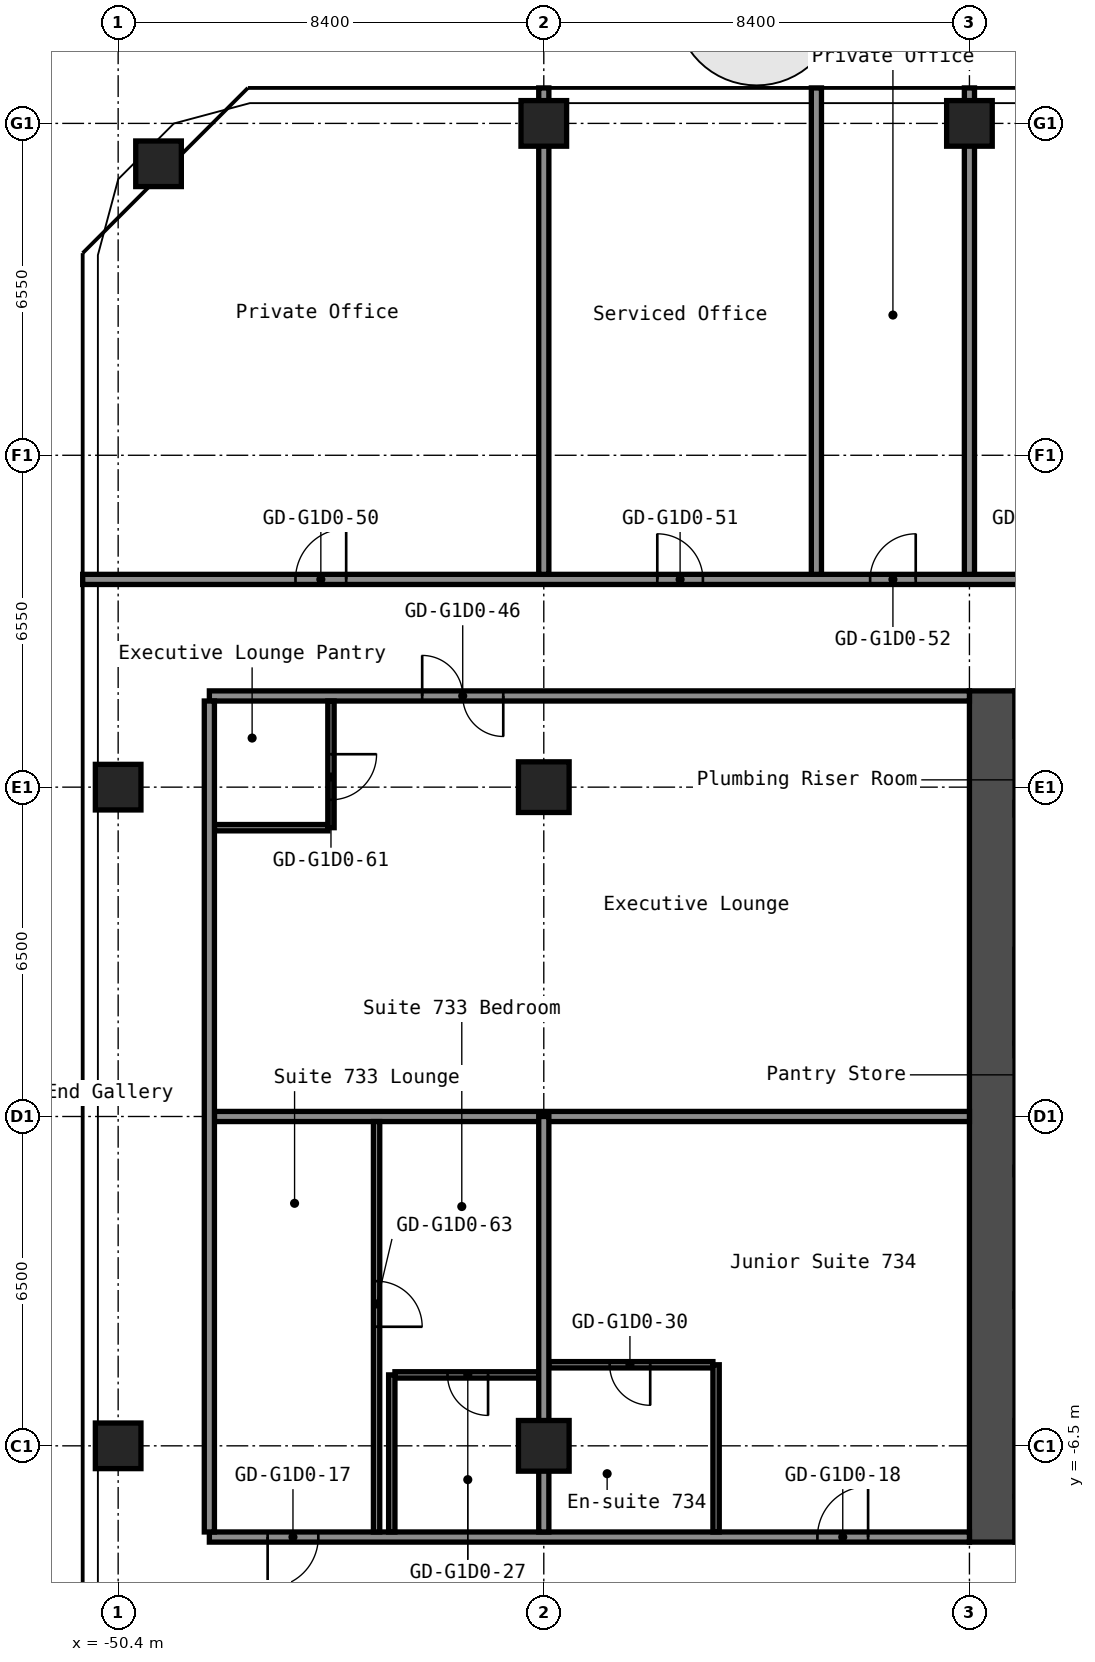
"""IFC4 building model, lengths in metres.
Left out: names, types, materials, properties, quantities, classifications, styles, units other than length and angle.
Written with IfcOpenShell. Run it as: python <this file> out.ifc"""

import sys

from ifc_helpers import new_model, si_unit, direction, frame, frame_2d, origin, origin_2d, place, context, subcontext, project, spatial, rectangle, hollow_rectangle, extrude, element, fill, save


model = new_model("IFC4")
c1 = context("Model", 3, precision=1e-05, world=origin(), true_north=direction((0.0, 1.0)))
c2 = subcontext(c1, "Body", "Model", "MODEL_VIEW")
j1 = project(units=[si_unit("LENGTHUNIT", "METRE"), si_unit("PLANEANGLEUNIT", "RADIAN")], contexts=[c1])
p1 = place(None, origin())
s1 = spatial("IfcSite", under=j1, at=p1, CompositionType="ELEMENT")
p2 = place(p1, origin())
s2 = spatial("IfcBuilding", under=s1, at=p2, CompositionType="ELEMENT")
p3 = place(p2, frame((0.0, 0.0, 29.4)))
s3 = spatial("IfcBuildingStorey", under=s2, at=p3, CompositionType="ELEMENT", Elevation=29.4)
for number, where, z_axis, x_axis in (
    (1, (-50.4, -6.5, 0.0), (0.0, 0.0, 1.0), (1.0, 0.0, 0.0)),
    (2, (-50.4, 6.5, 0.0), (0.0, 0.0, 1.0), (1.0, 0.0, 0.0)),
    (3, (-49.603, 18.803, 0.0), (0.0, 0.0, 1.0), (1.0, 0.0, 0.0)),
):
    element("IfcColumn", number, at=place(p3, frame(where, z_axis=z_axis, x_axis=x_axis)), inside=s3, PredefinedType="COLUMN", context=c2, shape_type="SweptSolid", body=[
        extrude(hollow_rectangle(XDim=0.9, YDim=0.9, WallThickness=0.036, at=origin_2d()), origin(), (0.0, 0.0, 1.0), 2.8),
    ])
for number, where, z_axis, x_axis in (
    (4, (-42.0, -6.5, 0.0), (0.0, 0.0, 1.0), (1.0, 0.0, 0.0)),
    (5, (-42.0, 6.5, 0.0), (0.0, 0.0, 1.0), (1.0, 0.0, 0.0)),
):
    element("IfcColumn", number, at=place(p3, frame(where, z_axis=z_axis, x_axis=x_axis)), inside=s3, PredefinedType="COLUMN", context=c2, shape_type="SweptSolid", body=[
        extrude(hollow_rectangle(XDim=1.0, YDim=1.0, WallThickness=0.04, at=origin_2d()), origin(), (0.0, 0.0, 1.0), 2.8),
    ])
for number, where, z_axis, x_axis in (
    (6, (-42.0, 19.6, 0.0), (0.0, 0.0, 1.0), (1.0, 0.0, 0.0)),
    (7, (-33.6, 19.6, 0.0), (0.0, 0.0, 1.0), (1.0, 0.0, 0.0)),
):
    element("IfcColumn", number, at=place(p3, frame(where, z_axis=z_axis, x_axis=x_axis)), inside=s3, PredefinedType="COLUMN", context=c2, shape_type="SweptSolid", body=[
        extrude(hollow_rectangle(XDim=0.9, YDim=0.9, WallThickness=0.036, at=origin_2d()), origin(), (0.0, 0.0, 1.0), 2.8),
    ])
p4 = place(p3, frame((-33.15, -8.4, 0.0), z_axis=(0.0, 0.0, 1.0), x_axis=(0.0, 1.0, 0.0)))
e8 = element("IfcWall", 8, at=p4, inside=s3, PredefinedType="SHEAR", context=c2, shape_type="SweptSolid", body=[
    extrude(rectangle(XDim=16.8, YDim=0.9, at=frame_2d((8.4, 0.0))), origin(), (0.0, 0.0, 1.0), 2.8),
])
p5 = place(p3, frame((-32.7, 1.325, 0.0), z_axis=(0.0, 0.0, 1.0), x_axis=(1.0, 0.0, 0.0)))
e9 = element("IfcWall", 9, at=p5, inside=s3, PredefinedType="SHEAR", context=c2, shape_type="SweptSolid", body=[
    extrude(rectangle(XDim=5.05, YDim=0.25, at=frame_2d((2.525, 0.0))), origin(), (0.0, 0.0, 1.0), 2.8),
])
p6 = place(p5, frame((3.3, 0.0, 0.0)))
e10 = element("IfcOpeningElement", 10, at=p6, cuts=e9, PredefinedType="OPENING", context=c2, shape_type="SweptSolid", body=[
    extrude(rectangle(XDim=1.2, YDim=2.1, at=frame_2d((0.6, 1.05))), frame((0.0, 0.135, 0.0), z_axis=(0.0, -1.0, 0.0), x_axis=(1.0, 0.0, 0.0)), (0.0, 0.0, 1.0), 0.27),
])
p7 = place(p3, frame((-32.7, -3.625, 0.0), z_axis=(0.0, 0.0, 1.0), x_axis=(1.0, 0.0, 0.0)))
e11 = element("IfcWall", 11, at=p7, inside=s3, PredefinedType="SHEAR", context=c2, shape_type="SweptSolid", body=[
    extrude(rectangle(XDim=4.55, YDim=0.25, at=frame_2d((2.275, 0.0))), origin(), (0.0, 0.0, 1.0), 2.8),
])
p8 = place(p7, frame((2.85, 0.0, 0.0)))
e12 = element("IfcOpeningElement", 12, at=p8, cuts=e11, PredefinedType="OPENING", context=c2, shape_type="SweptSolid", body=[
    extrude(rectangle(XDim=1.1, YDim=2.1, at=frame_2d((0.55, 1.05))), frame((0.0, 0.135, 0.0), z_axis=(0.0, -1.0, 0.0), x_axis=(1.0, 0.0, 0.0)), (0.0, 0.0, 1.0), 0.27),
])
p9 = place(p7, frame((0.6, 0.0, 0.0)))
e13 = element("IfcOpeningElement", 13, at=p9, cuts=e11, PredefinedType="OPENING", context=c2, shape_type="SweptSolid", body=[
    extrude(rectangle(XDim=1.1, YDim=2.1, at=frame_2d((0.55, 1.05))), frame((0.0, 0.135, 0.0), z_axis=(0.0, -1.0, 0.0), x_axis=(1.0, 0.0, 0.0)), (0.0, 0.0, 1.0), 0.27),
])
p10 = place(p3, frame((-32.7, -6.75, 0.0), z_axis=(0.0, 0.0, 1.0), x_axis=(1.0, 0.0, 0.0)))
e14 = element("IfcWall", 14, at=p10, inside=s3, PredefinedType="SHEAR", context=c2, shape_type="SweptSolid", body=[
    extrude(rectangle(XDim=4.55, YDim=1.5, at=frame_2d((2.275, 0.0))), origin(), (0.0, 0.0, 1.0), 2.8),
])
p11 = place(p3, frame((-48.6, -8.3, 0.0), z_axis=(0.0, 0.0, 1.0), x_axis=(1.0, 0.0, 0.0)))
e15 = element("IfcWall", 15, at=p11, inside=s3, PredefinedType="PARTITIONING", context=c2, shape_type="SweptSolid", body=[
    extrude(rectangle(XDim=15.0, YDim=0.2, at=frame_2d((7.5, 0.0))), origin(), (0.0, 0.0, 1.0), 2.8),
])
p12 = place(p11, frame((1.15, 0.0, 0.0)))
e16 = element("IfcOpeningElement", 16, at=p12, cuts=e15, PredefinedType="OPENING", context=c2, shape_type="SweptSolid", body=[
    extrude(rectangle(XDim=1.0, YDim=2.1, at=frame_2d((0.5, 1.05))), frame((0.0, 0.11, 0.0), z_axis=(0.0, -1.0, 0.0), x_axis=(1.0, 0.0, 0.0)), (0.0, 0.0, 1.0), 0.22),
])
p13 = place(p11, frame((12.0, 0.0, 0.0)))
e17 = element("IfcOpeningElement", 17, at=p13, cuts=e15, PredefinedType="OPENING", context=c2, shape_type="SweptSolid", body=[
    extrude(rectangle(XDim=1.0, YDim=2.1, at=frame_2d((0.5, 1.05))), frame((0.0, 0.11, 0.0), z_axis=(0.0, -1.0, 0.0), x_axis=(1.0, 0.0, 0.0)), (0.0, 0.0, 1.0), 0.22),
])
p14 = place(p3, frame((-44.938, -5.1, 0.0), z_axis=(0.0, 0.0, 1.0), x_axis=(1.0, 0.0, 0.0)))
e18 = element("IfcWall", 18, at=p14, inside=s3, PredefinedType="PARTITIONING", context=c2, shape_type="SweptSolid", body=[
    extrude(rectangle(XDim=2.837, YDim=0.125, at=frame_2d((1.419, 0.0))), origin(), (0.0, 0.0, 1.0), 2.8),
])
p15 = place(p14, frame((1.038, 0.0, 0.0)))
e19 = element("IfcOpeningElement", 19, at=p15, cuts=e18, PredefinedType="OPENING", context=c2, shape_type="SweptSolid", body=[
    extrude(rectangle(XDim=0.8, YDim=2.1, at=frame_2d((0.4, 1.05))), frame((0.0, 0.073, 0.0), z_axis=(0.0, -1.0, 0.0), x_axis=(1.0, 0.0, 0.0)), (0.0, 0.0, 1.0), 0.145),
])
p16 = place(p3, frame((-41.9, -4.9, 0.0), z_axis=(0.0, 0.0, 1.0), x_axis=(1.0, 0.0, 0.0)))
e20 = element("IfcWall", 20, at=p16, inside=s3, PredefinedType="PARTITIONING", context=c2, shape_type="SweptSolid", body=[
    extrude(rectangle(XDim=3.237, YDim=0.125, at=frame_2d((1.619, 0.0))), origin(), (0.0, 0.0, 1.0), 2.8),
])
p17 = place(p16, frame((1.2, 0.0, 0.0)))
e21 = element("IfcOpeningElement", 21, at=p17, cuts=e20, PredefinedType="OPENING", context=c2, shape_type="SweptSolid", body=[
    extrude(rectangle(XDim=0.8, YDim=2.1, at=frame_2d((0.4, 1.05))), frame((0.0, 0.073, 0.0), z_axis=(0.0, -1.0, 0.0), x_axis=(1.0, 0.0, 0.0)), (0.0, 0.0, 1.0), 0.145),
])
p18 = place(p3, frame((-48.5, 0.0, 0.0), z_axis=(0.0, 0.0, 1.0), x_axis=(1.0, 0.0, 0.0)))
e22 = element("IfcWall", 22, at=p18, inside=s3, PredefinedType="PARTITIONING", context=c2, shape_type="SweptSolid", body=[
    extrude(rectangle(XDim=14.9, YDim=0.2, at=frame_2d((7.45, 0.0))), origin(), (0.0, 0.0, 1.0), 2.8),
])
p19 = place(p3, frame((-48.5, 5.7, 0.0), z_axis=(0.0, 0.0, 1.0), x_axis=(1.0, 0.0, 0.0)))
e23 = element("IfcWall", 23, at=p19, inside=s3, PredefinedType="PARTITIONING", context=c2, shape_type="SweptSolid", body=[
    extrude(rectangle(XDim=2.238, YDim=0.125, at=frame_2d((1.119, 0.0))), origin(), (0.0, 0.0, 1.0), 2.8),
])
p20 = place(p3, frame((-48.6, 8.3, 0.0), z_axis=(0.0, 0.0, 1.0), x_axis=(1.0, 0.0, 0.0)))
e24 = element("IfcWall", 24, at=p20, inside=s3, PredefinedType="PARTITIONING", context=c2, shape_type="SweptSolid", body=[
    extrude(rectangle(XDim=15.0, YDim=0.2, at=frame_2d((7.5, 0.0))), origin(), (0.0, 0.0, 1.0), 2.8),
])
p21 = place(p20, frame((4.2, 0.0, 0.0)))
e25 = element("IfcOpeningElement", 25, at=p21, cuts=e24, PredefinedType="OPENING", context=c2, shape_type="SweptSolid", body=[
    extrude(rectangle(XDim=1.6, YDim=2.1, at=frame_2d((0.8, 1.05))), frame((0.0, 0.11, 0.0), z_axis=(0.0, -1.0, 0.0), x_axis=(1.0, 0.0, 0.0)), (0.0, 0.0, 1.0), 0.22),
])
p22 = place(p3, frame((-51.1, 10.6, 0.0), z_axis=(0.0, 0.0, 1.0), x_axis=(1.0, 0.0, 0.0)))
e26 = element("IfcWall", 26, at=p22, inside=s3, PredefinedType="PARTITIONING", context=c2, shape_type="SweptSolid", body=[
    extrude(rectangle(XDim=34.3, YDim=0.2, at=frame_2d((17.15, 0.0))), origin(), (0.0, 0.0, 1.0), 2.8),
])
p23 = place(p22, frame((4.2, 0.0, 0.0)))
e27 = element("IfcOpeningElement", 27, at=p23, cuts=e26, PredefinedType="OPENING", context=c2, shape_type="SweptSolid", body=[
    extrude(rectangle(XDim=1.0, YDim=2.1, at=frame_2d((0.5, 1.05))), frame((0.0, 0.11, 0.0), z_axis=(0.0, -1.0, 0.0), x_axis=(1.0, 0.0, 0.0)), (0.0, 0.0, 1.0), 0.22),
])
p24 = place(p22, frame((11.34, 0.0, 0.0)))
e28 = element("IfcOpeningElement", 28, at=p24, cuts=e26, PredefinedType="OPENING", context=c2, shape_type="SweptSolid", body=[
    extrude(rectangle(XDim=0.9, YDim=2.1, at=frame_2d((0.45, 1.05))), frame((0.0, 0.11, 0.0), z_axis=(0.0, -1.0, 0.0), x_axis=(1.0, 0.0, 0.0)), (0.0, 0.0, 1.0), 0.22),
])
p25 = place(p22, frame((15.54, 0.0, 0.0)))
e29 = element("IfcOpeningElement", 29, at=p25, cuts=e26, PredefinedType="OPENING", context=c2, shape_type="SweptSolid", body=[
    extrude(rectangle(XDim=0.9, YDim=2.1, at=frame_2d((0.45, 1.05))), frame((0.0, 0.11, 0.0), z_axis=(0.0, -1.0, 0.0), x_axis=(1.0, 0.0, 0.0)), (0.0, 0.0, 1.0), 0.22),
])
p26 = place(p22, frame((18.645, 0.0, 0.0)))
e30 = element("IfcOpeningElement", 30, at=p26, cuts=e26, PredefinedType="OPENING", context=c2, shape_type="SweptSolid", body=[
    extrude(rectangle(XDim=0.9, YDim=2.1, at=frame_2d((0.45, 1.05))), frame((0.0, 0.11, 0.0), z_axis=(0.0, -1.0, 0.0), x_axis=(1.0, 0.0, 0.0)), (0.0, 0.0, 1.0), 0.22),
])
p27 = place(p22, frame((22.845, 0.0, 0.0)))
e31 = element("IfcOpeningElement", 31, at=p27, cuts=e26, PredefinedType="OPENING", context=c2, shape_type="SweptSolid", body=[
    extrude(rectangle(XDim=0.9, YDim=2.1, at=frame_2d((0.45, 1.05))), frame((0.0, 0.11, 0.0), z_axis=(0.0, -1.0, 0.0), x_axis=(1.0, 0.0, 0.0)), (0.0, 0.0, 1.0), 0.22),
])
p28 = place(p22, frame((27.215, 0.0, 0.0)))
e32 = element("IfcOpeningElement", 32, at=p28, cuts=e26, PredefinedType="OPENING", context=c2, shape_type="SweptSolid", body=[
    extrude(rectangle(XDim=0.9, YDim=2.1, at=frame_2d((0.45, 1.05))), frame((0.0, 0.11, 0.0), z_axis=(0.0, -1.0, 0.0), x_axis=(1.0, 0.0, 0.0)), (0.0, 0.0, 1.0), 0.22),
])
p29 = place(p22, frame((31.415, 0.0, 0.0)))
e33 = element("IfcOpeningElement", 33, at=p29, cuts=e26, PredefinedType="OPENING", context=c2, shape_type="SweptSolid", body=[
    extrude(rectangle(XDim=0.9, YDim=2.1, at=frame_2d((0.45, 1.05))), frame((0.0, 0.11, 0.0), z_axis=(0.0, -1.0, 0.0), x_axis=(1.0, 0.0, 0.0)), (0.0, 0.0, 1.0), 0.22),
])
p30 = place(p3, frame((-48.6, -8.2, 0.0), z_axis=(0.0, 0.0, 1.0), x_axis=(0.0, 1.0, 0.0)))
e34 = element("IfcWall", 34, at=p30, inside=s3, PredefinedType="PARTITIONING", context=c2, shape_type="SweptSolid", body=[
    extrude(rectangle(XDim=16.4, YDim=0.2, at=frame_2d((8.2, 0.0))), origin(), (0.0, 0.0, 1.0), 2.8),
])
p31 = place(p3, frame((-46.2, 5.7, 0.0), z_axis=(0.0, 0.0, 1.0), x_axis=(0.0, 1.0, 0.0)))
e35 = element("IfcWall", 35, at=p31, inside=s3, PredefinedType="PARTITIONING", context=c2, shape_type="SweptSolid", body=[
    extrude(rectangle(XDim=2.5, YDim=0.125, at=frame_2d((1.25, 0.0))), origin(), (0.0, 0.0, 1.0), 2.8),
])
p32 = place(p31, frame((0.55, 0.0, 0.0)))
e36 = element("IfcOpeningElement", 36, at=p32, cuts=e35, PredefinedType="OPENING", context=c2, shape_type="SweptSolid", body=[
    extrude(rectangle(XDim=0.9, YDim=2.1, at=frame_2d((0.45, 1.05))), frame((0.0, 0.073, 0.0), z_axis=(0.0, -1.0, 0.0), x_axis=(1.0, 0.0, 0.0)), (0.0, 0.0, 1.0), 0.145),
])
p33 = place(p3, frame((-45.3, -8.2, 0.0), z_axis=(0.0, 0.0, 1.0), x_axis=(0.0, 1.0, 0.0)))
e37 = element("IfcWall", 37, at=p33, inside=s3, PredefinedType="PARTITIONING", context=c2, shape_type="SweptSolid", body=[
    extrude(rectangle(XDim=8.1, YDim=0.125, at=frame_2d((4.05, 0.0))), origin(), (0.0, 0.0, 1.0), 2.8),
])
p34 = place(p33, frame((4.05, 0.0, 0.0)))
e38 = element("IfcOpeningElement", 38, at=p34, cuts=e37, PredefinedType="OPENING", context=c2, shape_type="SweptSolid", body=[
    extrude(rectangle(XDim=0.9, YDim=2.1, at=frame_2d((0.45, 1.05))), frame((0.0, 0.073, 0.0), z_axis=(0.0, -1.0, 0.0), x_axis=(1.0, 0.0, 0.0)), (0.0, 0.0, 1.0), 0.145),
])
p35 = place(p3, frame((-45.0, -8.2, 0.0), z_axis=(0.0, 0.0, 1.0), x_axis=(0.0, 1.0, 0.0)))
e39 = element("IfcWall", 39, at=p35, inside=s3, PredefinedType="PARTITIONING", context=c2, shape_type="SweptSolid", body=[
    extrude(rectangle(XDim=3.1, YDim=0.125, at=frame_2d((1.55, 0.0))), origin(), (0.0, 0.0, 1.0), 2.8),
])
p36 = place(p3, frame((-42.0, -8.2, 0.0), z_axis=(0.0, 0.0, 1.0), x_axis=(0.0, 1.0, 0.0)))
e40 = element("IfcWall", 40, at=p36, inside=s3, PredefinedType="PARTITIONING", context=c2, shape_type="SweptSolid", body=[
    extrude(rectangle(XDim=8.2, YDim=0.2, at=frame_2d((4.1, 0.0))), origin(), (0.0, 0.0, 1.0), 2.8),
])
p37 = place(p3, frame((-42.0, 10.7, 0.0), z_axis=(0.0, 0.0, 1.0), x_axis=(0.0, 1.0, 0.0)))
e41 = element("IfcWall", 41, at=p37, inside=s3, PredefinedType="PARTITIONING", context=c2, shape_type="SweptSolid", body=[
    extrude(rectangle(XDim=9.6, YDim=0.2, at=frame_2d((4.8, 0.0))), origin(), (0.0, 0.0, 1.0), 2.8),
])
p38 = place(p3, frame((-38.6, -8.2, 0.0), z_axis=(0.0, 0.0, 1.0), x_axis=(0.0, 1.0, 0.0)))
e42 = element("IfcWall", 42, at=p38, inside=s3, PredefinedType="PARTITIONING", context=c2, shape_type="SweptSolid", body=[
    extrude(rectangle(XDim=3.3, YDim=0.125, at=frame_2d((1.65, 0.0))), origin(), (0.0, 0.0, 1.0), 2.8),
])
for number, where, z_axis, x_axis in (
    (43, (-36.62, 10.7, 0.0), (0.0, 0.0, 1.0), (0.0, 1.0, 0.0)),
    (44, (-33.6, 10.7, 0.0), (0.0, 0.0, 1.0), (0.0, 1.0, 0.0)),
):
    element("IfcWall", number, at=place(p3, frame(where, z_axis=z_axis, x_axis=x_axis)), inside=s3, PredefinedType="PARTITIONING", context=c2, shape_type="SweptSolid", body=[
        extrude(rectangle(XDim=9.6, YDim=0.2, at=frame_2d((4.8, 0.0))), origin(), (0.0, 0.0, 1.0), 2.8),
    ])
p39 = place(p12, origin())
e45 = element("IfcDoor", 45, at=p39, inside=s3, OperationType="SINGLE_SWING_LEFT", PredefinedType="DOOR", context=c2, shape_type="SweptSolid", body=[
    extrude(rectangle(XDim=1.0, YDim=2.1, at=frame_2d((0.5, 1.05))), frame((0.0, 0.025, 0.0), z_axis=(0.0, -1.0, 0.0), x_axis=(1.0, 0.0, 0.0)), (0.0, 0.0, 1.0), 0.05),
])
fill(e16, e45)
p40 = place(p13, origin())
e46 = element("IfcDoor", 46, at=p40, inside=s3, OperationType="SINGLE_SWING_LEFT", PredefinedType="DOOR", context=c2, shape_type="SweptSolid", body=[
    extrude(rectangle(XDim=1.0, YDim=2.1, at=frame_2d((0.5, 1.05))), frame((0.0, 0.025, 0.0), z_axis=(0.0, -1.0, 0.0), x_axis=(1.0, 0.0, 0.0)), (0.0, 0.0, 1.0), 0.05),
])
fill(e17, e46)
p41 = place(p15, origin())
e47 = element("IfcDoor", 47, at=p41, inside=s3, OperationType="SINGLE_SWING_RIGHT", PredefinedType="DOOR", context=c2, shape_type="SweptSolid", body=[
    extrude(rectangle(XDim=0.8, YDim=2.1, at=frame_2d((0.4, 1.05))), frame((0.0, 0.025, 0.0), z_axis=(0.0, -1.0, 0.0), x_axis=(1.0, 0.0, 0.0)), (0.0, 0.0, 1.0), 0.05),
])
fill(e19, e47)
p42 = place(p17, origin())
e48 = element("IfcDoor", 48, at=p42, inside=s3, OperationType="SINGLE_SWING_RIGHT", PredefinedType="DOOR", context=c2, shape_type="SweptSolid", body=[
    extrude(rectangle(XDim=0.8, YDim=2.1, at=frame_2d((0.4, 1.05))), frame((0.0, 0.025, 0.0), z_axis=(0.0, -1.0, 0.0), x_axis=(1.0, 0.0, 0.0)), (0.0, 0.0, 1.0), 0.05),
])
fill(e21, e48)
p43 = place(p21, origin())
e49 = element("IfcDoor", 49, at=p43, inside=s3, OperationType="DOUBLE_DOOR_SINGLE_SWING", PredefinedType="DOOR", context=c2, shape_type="SweptSolid", body=[
    extrude(rectangle(XDim=1.6, YDim=2.1, at=frame_2d((0.8, 1.05))), frame((0.0, 0.025, 0.0), z_axis=(0.0, -1.0, 0.0), x_axis=(1.0, 0.0, 0.0)), (0.0, 0.0, 1.0), 0.05),
])
fill(e25, e49)
p44 = place(p23, origin())
e50 = element("IfcDoor", 50, at=p44, inside=s3, OperationType="SINGLE_SWING_LEFT", PredefinedType="DOOR", context=c2, shape_type="SweptSolid", body=[
    extrude(rectangle(XDim=1.0, YDim=2.1, at=frame_2d((0.5, 1.05))), frame((0.0, 0.025, 0.0), z_axis=(0.0, -1.0, 0.0), x_axis=(1.0, 0.0, 0.0)), (0.0, 0.0, 1.0), 0.05),
])
fill(e27, e50)
p45 = place(p24, origin())
e51 = element("IfcDoor", 51, at=p45, inside=s3, OperationType="SINGLE_SWING_RIGHT", PredefinedType="DOOR", context=c2, shape_type="SweptSolid", body=[
    extrude(rectangle(XDim=0.9, YDim=2.1, at=frame_2d((0.45, 1.05))), frame((0.0, 0.025, 0.0), z_axis=(0.0, -1.0, 0.0), x_axis=(1.0, 0.0, 0.0)), (0.0, 0.0, 1.0), 0.05),
])
fill(e28, e51)
p46 = place(p25, origin())
e52 = element("IfcDoor", 52, at=p46, inside=s3, OperationType="SINGLE_SWING_LEFT", PredefinedType="DOOR", context=c2, shape_type="SweptSolid", body=[
    extrude(rectangle(XDim=0.9, YDim=2.1, at=frame_2d((0.45, 1.05))), frame((0.0, 0.025, 0.0), z_axis=(0.0, -1.0, 0.0), x_axis=(1.0, 0.0, 0.0)), (0.0, 0.0, 1.0), 0.05),
])
fill(e29, e52)
p47 = place(p32, origin())
e53 = element("IfcDoor", 53, at=p47, inside=s3, OperationType="SINGLE_SWING_RIGHT", PredefinedType="DOOR", context=c2, shape_type="SweptSolid", body=[
    extrude(rectangle(XDim=0.9, YDim=2.1, at=frame_2d((0.45, 1.05))), frame((0.0, 0.025, 0.0), z_axis=(0.0, -1.0, 0.0), x_axis=(1.0, 0.0, 0.0)), (0.0, 0.0, 1.0), 0.05),
])
fill(e36, e53)
p48 = place(p34, origin())
e54 = element("IfcDoor", 54, at=p48, inside=s3, OperationType="SINGLE_SWING_LEFT", PredefinedType="DOOR", context=c2, shape_type="SweptSolid", body=[
    extrude(rectangle(XDim=0.9, YDim=2.1, at=frame_2d((0.45, 1.05))), frame((0.0, 0.025, 0.0), z_axis=(0.0, -1.0, 0.0), x_axis=(1.0, 0.0, 0.0)), (0.0, 0.0, 1.0), 0.05),
])
fill(e38, e54)
save(model, sys.argv[1])
